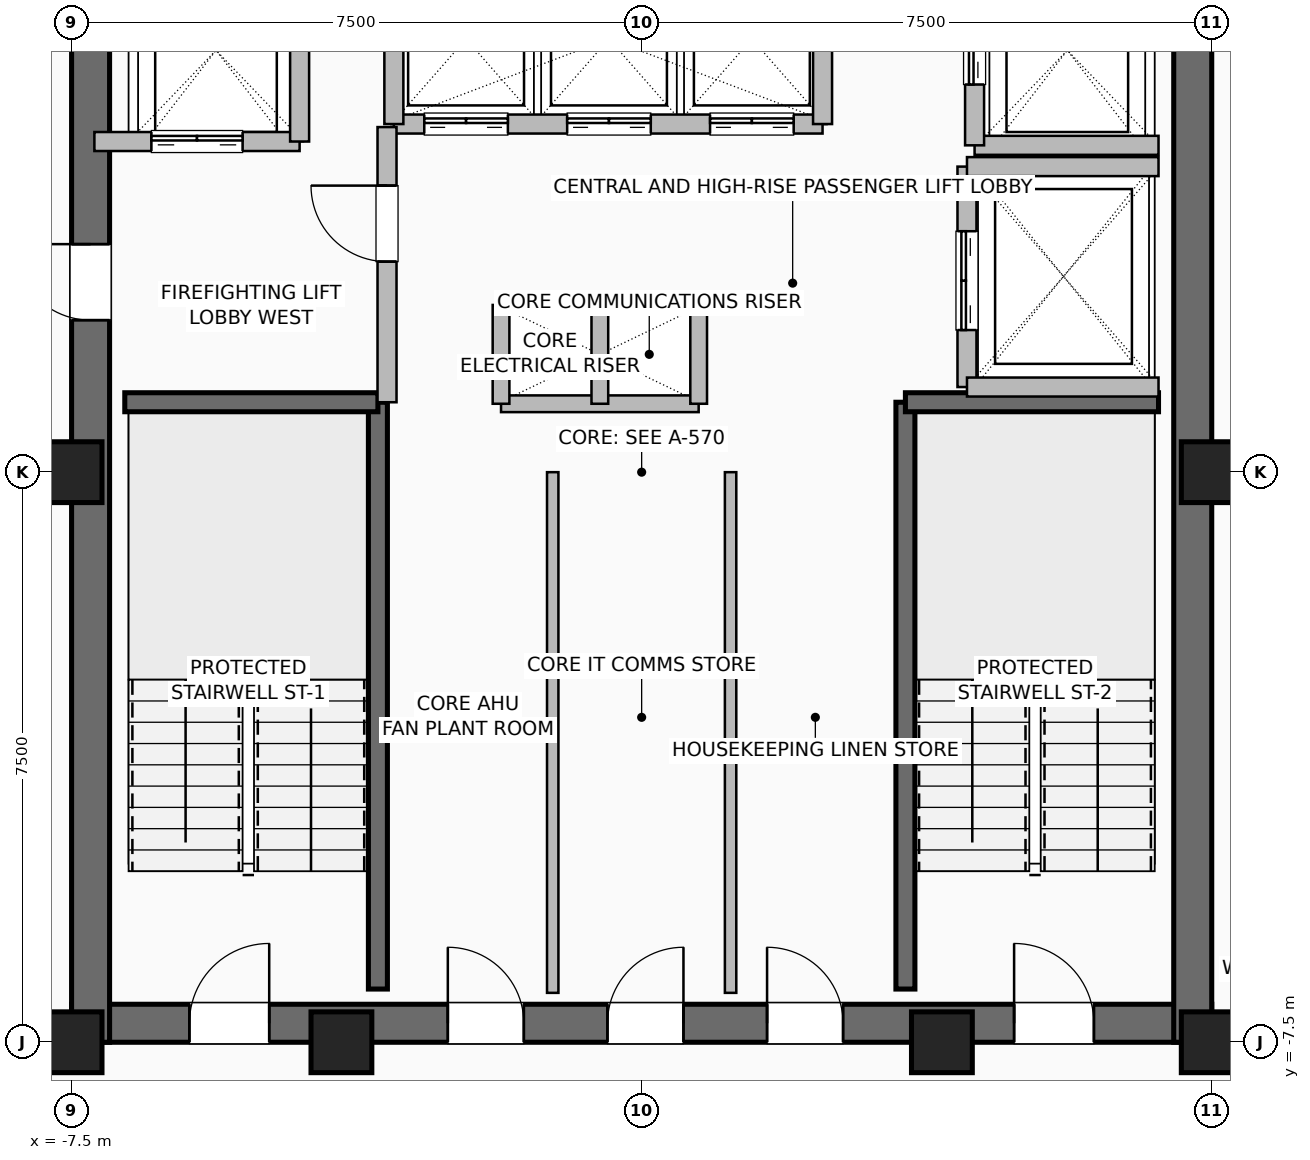
"""IFC4 building model, lengths in metres.
Left out: names, types, materials, properties, quantities, classifications, styles, units other than length and angle.
Written with IfcOpenShell. Run it as: python <this file> out.ifc"""

import sys

from ifc_helpers import new_model, si_unit, direction, frame, frame_2d, origin, origin_2d, place, context, subcontext, project, spatial, rectangle, hollow_rectangle, extrude, element, fill, save


model = new_model("IFC4")
c1 = context("Model", 3, precision=1e-05, world=origin(), true_north=direction((0.0, 1.0)))
c2 = subcontext(c1, "Body", "Model", "MODEL_VIEW")
j1 = project(units=[si_unit("LENGTHUNIT", "METRE"), si_unit("PLANEANGLEUNIT", "RADIAN")], contexts=[c1])
p1 = place(None, origin())
s1 = spatial("IfcSite", under=j1, at=p1, CompositionType="ELEMENT")
p2 = place(p1, origin())
s2 = spatial("IfcBuilding", under=s1, at=p2, CompositionType="ELEMENT")
p3 = place(p2, frame((0.0, 0.0, 279.2)))
s3 = spatial("IfcBuildingStorey", under=s2, at=p3, CompositionType="ELEMENT", Elevation=279.2)
for number, where, z_axis, x_axis in (
    (1, (-7.5, -7.5, 0.0), (0.0, 0.0, 1.0), (1.0, 0.0, 0.0)),
    (2, (-3.95, -7.5, 0.0), (0.0, 0.0, 1.0), (1.0, 0.0, 0.0)),
    (3, (3.95, -7.5, 0.0), (0.0, 0.0, 1.0), (1.0, 0.0, 0.0)),
    (4, (7.5, -7.5, 0.0), (0.0, 0.0, 1.0), (1.0, 0.0, 0.0)),
    (5, (7.5, 0.0, 0.0), (0.0, 0.0, 1.0), (1.0, 0.0, 0.0)),
    (6, (-7.5, 0.0, 0.0), (0.0, 0.0, 1.0), (1.0, 0.0, 0.0)),
):
    element("IfcColumn", number, at=place(p3, frame(where, z_axis=z_axis, x_axis=x_axis)), inside=s3, PredefinedType="COLUMN", context=c2, shape_type="SweptSolid", body=[
        extrude(hollow_rectangle(XDim=0.8, YDim=0.8, WallThickness=0.04, at=origin_2d()), origin(), (0.0, 0.0, 1.0), 3.6),
    ])
p4 = place(p3, frame((-7.5, -7.25, 0.0), z_axis=(0.0, 0.0, 1.0), x_axis=(1.0, 0.0, 0.0)))
e7 = element("IfcWall", 7, at=p4, inside=s3, PredefinedType="SHEAR", context=c2, shape_type="SweptSolid", body=[
    extrude(rectangle(XDim=15.0, YDim=0.5, at=frame_2d((7.5, 0.0))), origin(), (0.0, 0.0, 1.0), 3.36),
])
p5 = place(p4, frame((1.55, 0.0, 0.0)))
e8 = element("IfcOpeningElement", 8, at=p5, cuts=e7, PredefinedType="OPENING", context=c2, shape_type="SweptSolid", body=[
    extrude(rectangle(XDim=1.05, YDim=2.08, at=frame_2d((0.525, 1.04))), frame((0.0, 0.26, 0.0), z_axis=(0.0, -1.0, 0.0), x_axis=(1.0, 0.0, 0.0)), (0.0, 0.0, 1.0), 0.52),
])
p6 = place(p4, frame((12.4, 0.0, 0.0)))
e9 = element("IfcOpeningElement", 9, at=p6, cuts=e7, PredefinedType="OPENING", context=c2, shape_type="SweptSolid", body=[
    extrude(rectangle(XDim=1.05, YDim=2.08, at=frame_2d((0.525, 1.04))), frame((0.0, 0.26, 0.0), z_axis=(0.0, -1.0, 0.0), x_axis=(1.0, 0.0, 0.0)), (0.0, 0.0, 1.0), 0.52),
])
p7 = place(p4, frame((4.95, 0.0, 0.0)))
e10 = element("IfcOpeningElement", 10, at=p7, cuts=e7, PredefinedType="OPENING", context=c2, shape_type="SweptSolid", body=[
    extrude(rectangle(XDim=1.0, YDim=2.08, at=frame_2d((0.5, 1.04))), frame((0.0, 0.26, 0.0), z_axis=(0.0, -1.0, 0.0), x_axis=(1.0, 0.0, 0.0)), (0.0, 0.0, 1.0), 0.52),
])
p8 = place(p4, frame((7.05, 0.0, 0.0)))
e11 = element("IfcOpeningElement", 11, at=p8, cuts=e7, PredefinedType="OPENING", context=c2, shape_type="SweptSolid", body=[
    extrude(rectangle(XDim=1.0, YDim=2.08, at=frame_2d((0.5, 1.04))), frame((0.0, 0.26, 0.0), z_axis=(0.0, -1.0, 0.0), x_axis=(1.0, 0.0, 0.0)), (0.0, 0.0, 1.0), 0.52),
])
p9 = place(p4, frame((9.15, 0.0, 0.0)))
e12 = element("IfcOpeningElement", 12, at=p9, cuts=e7, PredefinedType="OPENING", context=c2, shape_type="SweptSolid", body=[
    extrude(rectangle(XDim=1.0, YDim=2.08, at=frame_2d((0.5, 1.04))), frame((0.0, 0.26, 0.0), z_axis=(0.0, -1.0, 0.0), x_axis=(1.0, 0.0, 0.0)), (0.0, 0.0, 1.0), 0.52),
])
p10 = place(p3, frame((-7.25, -7.5, 0.0), z_axis=(0.0, 0.0, 1.0), x_axis=(0.0, 1.0, 0.0)))
e13 = element("IfcWall", 13, at=p10, inside=s3, PredefinedType="SHEAR", context=c2, shape_type="SweptSolid", body=[
    extrude(rectangle(XDim=15.0, YDim=0.5, at=frame_2d((7.5, 0.0))), origin(), (0.0, 0.0, 1.0), 3.36),
])
p11 = place(p10, frame((9.5, 0.0, 0.0)))
e14 = element("IfcOpeningElement", 14, at=p11, cuts=e13, PredefinedType="OPENING", context=c2, shape_type="SweptSolid", body=[
    extrude(rectangle(XDim=1.0, YDim=2.08, at=frame_2d((0.5, 1.04))), frame((0.0, 0.26, 0.0), z_axis=(0.0, -1.0, 0.0), x_axis=(1.0, 0.0, 0.0)), (0.0, 0.0, 1.0), 0.52),
])
p12 = place(p3, frame((7.25, -7.5, 0.0), z_axis=(0.0, 0.0, 1.0), x_axis=(0.0, 1.0, 0.0)))
e15 = element("IfcWall", 15, at=p12, inside=s3, PredefinedType="SHEAR", context=c2, shape_type="SweptSolid", body=[
    extrude(rectangle(XDim=15.0, YDim=0.5, at=frame_2d((7.5, 0.0))), origin(), (0.0, 0.0, 1.0), 3.36),
])
p13 = place(p3, frame((-3.47, -6.8, 0.0), z_axis=(0.0, 0.0, 1.0), x_axis=(0.0, 1.0, 0.0)))
e16 = element("IfcWall", 16, at=p13, inside=s3, PredefinedType="SHEAR", context=c2, shape_type="SweptSolid", body=[
    extrude(rectangle(XDim=7.72, YDim=0.25, at=frame_2d((3.86, 0.0))), origin(), (0.0, 0.0, 1.0), 3.36),
])
p14 = place(p3, frame((-6.8, 0.92, 0.0), z_axis=(0.0, 0.0, 1.0), x_axis=(1.0, 0.0, 0.0)))
e17 = element("IfcWall", 17, at=p14, inside=s3, PredefinedType="SHEAR", context=c2, shape_type="SweptSolid", body=[
    extrude(rectangle(XDim=3.33, YDim=0.25, at=frame_2d((1.665, 0.0))), origin(), (0.0, 0.0, 1.0), 3.36),
])
p15 = place(p3, frame((3.47, -6.8, 0.0), z_axis=(0.0, 0.0, 1.0), x_axis=(0.0, 1.0, 0.0)))
e18 = element("IfcWall", 18, at=p15, inside=s3, PredefinedType="SHEAR", context=c2, shape_type="SweptSolid", body=[
    extrude(rectangle(XDim=7.72, YDim=0.25, at=frame_2d((3.86, 0.0))), origin(), (0.0, 0.0, 1.0), 3.36),
])
p16 = place(p3, frame((3.47, 0.92, 0.0), z_axis=(0.0, 0.0, 1.0), x_axis=(1.0, 0.0, 0.0)))
e19 = element("IfcWall", 19, at=p16, inside=s3, PredefinedType="SHEAR", context=c2, shape_type="SweptSolid", body=[
    extrude(rectangle(XDim=3.33, YDim=0.25, at=frame_2d((1.665, 0.0))), origin(), (0.0, 0.0, 1.0), 3.36),
])
for number, where, z_axis, x_axis in (
    (20, (-1.85, 2.2, 0.0), (0.0, 0.0, 1.0), (1.0, 0.0, 0.0)),
    (21, (-1.85, 0.9, 0.0), (0.0, 0.0, 1.0), (1.0, 0.0, 0.0)),
):
    element("IfcWall", number, at=place(p3, frame(where, z_axis=z_axis, x_axis=x_axis)), inside=s3, PredefinedType="PARTITIONING", context=c2, shape_type="SweptSolid", body=[
        extrude(rectangle(XDim=2.6, YDim=0.22, at=frame_2d((1.3, 0.0))), origin(), (0.0, 0.0, 1.0), 3.36),
    ])
for number, where, z_axis, x_axis in (
    (22, (-0.55, 0.9, 0.0), (0.0, 0.0, 1.0), (0.0, 1.0, 0.0)),
    (23, (0.75, 0.9, 0.0), (0.0, 0.0, 1.0), (0.0, 1.0, 0.0)),
    (24, (-1.85, 0.9, 0.0), (0.0, 0.0, 1.0), (0.0, 1.0, 0.0)),
):
    element("IfcWall", number, at=place(p3, frame(where, z_axis=z_axis, x_axis=x_axis)), inside=s3, PredefinedType="PARTITIONING", context=c2, shape_type="SweptSolid", body=[
        extrude(rectangle(XDim=1.3, YDim=0.22, at=frame_2d((0.65, 0.0))), origin(), (0.0, 0.0, 1.0), 3.36),
    ])
p17 = place(p3, frame((-3.26, 4.58, 0.0), z_axis=(0.0, 0.0, 1.0), x_axis=(1.0, 0.0, 0.0)))
e25 = element("IfcWall", 25, at=p17, inside=s3, PredefinedType="SHEAR", context=c2, shape_type="SweptSolid", body=[
    extrude(rectangle(XDim=5.64, YDim=0.25, at=frame_2d((2.82, 0.0))), origin(), (0.0, 0.0, 1.0), 3.36),
])
p18 = place(p17, frame((0.4, 0.0, 0.0)))
e26 = element("IfcOpeningElement", 26, at=p18, cuts=e25, PredefinedType="OPENING", context=c2, shape_type="SweptSolid", body=[
    extrude(rectangle(XDim=1.1, YDim=2.2, at=frame_2d((0.55, 1.1))), frame((0.0, 0.135, 0.0), z_axis=(0.0, -1.0, 0.0), x_axis=(1.0, 0.0, 0.0)), (0.0, 0.0, 1.0), 0.27),
])
p19 = place(p17, frame((2.28, 0.0, 0.0)))
e27 = element("IfcOpeningElement", 27, at=p19, cuts=e25, PredefinedType="OPENING", context=c2, shape_type="SweptSolid", body=[
    extrude(rectangle(XDim=1.1, YDim=2.2, at=frame_2d((0.55, 1.1))), frame((0.0, 0.135, 0.0), z_axis=(0.0, -1.0, 0.0), x_axis=(1.0, 0.0, 0.0)), (0.0, 0.0, 1.0), 0.27),
])
p20 = place(p17, frame((4.16, 0.0, 0.0)))
e28 = element("IfcOpeningElement", 28, at=p20, cuts=e25, PredefinedType="OPENING", context=c2, shape_type="SweptSolid", body=[
    extrude(rectangle(XDim=1.1, YDim=2.2, at=frame_2d((0.55, 1.1))), frame((0.0, 0.135, 0.0), z_axis=(0.0, -1.0, 0.0), x_axis=(1.0, 0.0, 0.0)), (0.0, 0.0, 1.0), 0.27),
])
for number, where, z_axis, x_axis in (
    (29, (-3.26, 4.58, 0.0), (0.0, 0.0, 1.0), (0.0, 1.0, 0.0)),
    (30, (2.38, 4.58, 0.0), (0.0, 0.0, 1.0), (0.0, 1.0, 0.0)),
):
    element("IfcWall", number, at=place(p3, frame(where, z_axis=z_axis, x_axis=x_axis)), inside=s3, PredefinedType="SHEAR", context=c2, shape_type="SweptSolid", body=[
        extrude(rectangle(XDim=2.22, YDim=0.25, at=frame_2d((1.11, 0.0))), origin(), (0.0, 0.0, 1.0), 3.36),
    ])
p21 = place(p3, frame((-7.2, 4.35, 0.0), z_axis=(0.0, 0.0, 1.0), x_axis=(1.0, 0.0, 0.0)))
e31 = element("IfcWall", 31, at=p21, inside=s3, PredefinedType="SHEAR", context=c2, shape_type="SweptSolid", body=[
    extrude(rectangle(XDim=2.7, YDim=0.25, at=frame_2d((1.35, 0.0))), origin(), (0.0, 0.0, 1.0), 3.36),
])
p22 = place(p21, frame((0.75, 0.0, 0.0)))
e32 = element("IfcOpeningElement", 32, at=p22, cuts=e31, PredefinedType="OPENING", context=c2, shape_type="SweptSolid", body=[
    extrude(rectangle(XDim=1.2, YDim=2.2, at=frame_2d((0.6, 1.1))), frame((0.0, 0.135, 0.0), z_axis=(0.0, -1.0, 0.0), x_axis=(1.0, 0.0, 0.0)), (0.0, 0.0, 1.0), 0.27),
])
p23 = place(p3, frame((-4.5, 4.35, 0.0), z_axis=(0.0, 0.0, 1.0), x_axis=(0.0, 1.0, 0.0)))
e33 = element("IfcWall", 33, at=p23, inside=s3, PredefinedType="SHEAR", context=c2, shape_type="SweptSolid", body=[
    extrude(rectangle(XDim=2.85, YDim=0.25, at=frame_2d((1.425, 0.0))), origin(), (0.0, 0.0, 1.0), 3.36),
])
p24 = place(p3, frame((4.38, 4.3, 0.0), z_axis=(0.0, 0.0, 1.0), x_axis=(1.0, 0.0, 0.0)))
e34 = element("IfcWall", 34, at=p24, inside=s3, PredefinedType="SHEAR", context=c2, shape_type="SweptSolid", body=[
    extrude(rectangle(XDim=2.42, YDim=0.25, at=frame_2d((1.21, 0.0))), origin(), (0.0, 0.0, 1.0), 3.36),
])
p25 = place(p3, frame((4.38, 4.3, 0.0), z_axis=(0.0, 0.0, 1.0), x_axis=(0.0, 1.0, 0.0)))
e35 = element("IfcWall", 35, at=p25, inside=s3, PredefinedType="SHEAR", context=c2, shape_type="SweptSolid", body=[
    extrude(rectangle(XDim=2.5, YDim=0.25, at=frame_2d((1.25, 0.0))), origin(), (0.0, 0.0, 1.0), 3.36),
])
p26 = place(p25, frame((0.8, 0.0, 0.0)))
e36 = element("IfcOpeningElement", 36, at=p26, cuts=e35, PredefinedType="OPENING", context=c2, shape_type="SweptSolid", body=[
    extrude(rectangle(XDim=1.2, YDim=2.2, at=frame_2d((0.6, 1.1))), frame((0.0, 0.135, 0.0), z_axis=(0.0, -1.0, 0.0), x_axis=(1.0, 0.0, 0.0)), (0.0, 0.0, 1.0), 0.27),
])
p27 = place(p3, frame((4.28, 1.12, 0.0), z_axis=(0.0, 0.0, 1.0), x_axis=(0.0, 1.0, 0.0)))
e37 = element("IfcWall", 37, at=p27, inside=s3, PredefinedType="SHEAR", context=c2, shape_type="SweptSolid", body=[
    extrude(rectangle(XDim=2.9, YDim=0.25, at=frame_2d((1.45, 0.0))), origin(), (0.0, 0.0, 1.0), 3.36),
])
p28 = place(p27, frame((0.75, 0.0, 0.0)))
e38 = element("IfcOpeningElement", 38, at=p28, cuts=e37, PredefinedType="OPENING", context=c2, shape_type="SweptSolid", body=[
    extrude(rectangle(XDim=1.3, YDim=2.3, at=frame_2d((0.65, 1.15))), frame((0.0, 0.135, 0.0), z_axis=(0.0, -1.0, 0.0), x_axis=(1.0, 0.0, 0.0)), (0.0, 0.0, 1.0), 0.27),
])
for number, where, z_axis, x_axis in (
    (39, (4.28, 1.12, 0.0), (0.0, 0.0, 1.0), (1.0, 0.0, 0.0)),
    (40, (4.28, 4.02, 0.0), (0.0, 0.0, 1.0), (1.0, 0.0, 0.0)),
):
    element("IfcWall", number, at=place(p3, frame(where, z_axis=z_axis, x_axis=x_axis)), inside=s3, PredefinedType="SHEAR", context=c2, shape_type="SweptSolid", body=[
        extrude(rectangle(XDim=2.52, YDim=0.25, at=frame_2d((1.26, 0.0))), origin(), (0.0, 0.0, 1.0), 3.36),
    ])
p29 = place(p3, frame((-3.35, 0.92, 0.0), z_axis=(0.0, 0.0, 1.0), x_axis=(0.0, 1.0, 0.0)))
e41 = element("IfcWall", 41, at=p29, inside=s3, PredefinedType="SHEAR", context=c2, shape_type="SweptSolid", body=[
    extrude(rectangle(XDim=3.62, YDim=0.25, at=frame_2d((1.81, 0.0))), origin(), (0.0, 0.0, 1.0), 3.36),
])
p30 = place(p29, frame((1.85, 0.0, 0.0)))
e42 = element("IfcOpeningElement", 42, at=p30, cuts=e41, PredefinedType="OPENING", context=c2, shape_type="SweptSolid", body=[
    extrude(rectangle(XDim=1.0, YDim=2.08, at=frame_2d((0.5, 1.04))), frame((0.0, 0.135, 0.0), z_axis=(0.0, -1.0, 0.0), x_axis=(1.0, 0.0, 0.0)), (0.0, 0.0, 1.0), 0.27),
])
for number, where, z_axis, x_axis in (
    (43, (-1.17, -6.85, 0.0), (0.0, 0.0, 1.0), (0.0, 1.0, 0.0)),
    (44, (1.17, -6.85, 0.0), (0.0, 0.0, 1.0), (0.0, 1.0, 0.0)),
):
    element("IfcWall", number, at=place(p3, frame(where, z_axis=z_axis, x_axis=x_axis)), inside=s3, PredefinedType="PARTITIONING", context=c2, shape_type="SweptSolid", body=[
        extrude(rectangle(XDim=6.85, YDim=0.15, at=frame_2d((3.425, 0.0))), origin(), (0.0, 0.0, 1.0), 3.36),
    ])
p31 = place(p3, frame((7.45, -7.48, 0.0), z_axis=(0.0, 0.0, 1.0), x_axis=(1.0, 0.0, 0.0)))
e45 = element("IfcWall", 45, at=p31, inside=s3, PredefinedType="PARTITIONING", context=c2, shape_type="SweptSolid", body=[
    extrude(rectangle(XDim=0.95, YDim=0.15, at=frame_2d((0.475, 0.0))), origin(), (0.0, 0.0, 1.0), 3.36),
])
p32 = place(p5, origin())
e46 = element("IfcDoor", 46, at=p32, inside=s3, OperationType="SINGLE_SWING_RIGHT", PredefinedType="DOOR", context=c2, shape_type="SweptSolid", body=[
    extrude(rectangle(XDim=1.05, YDim=2.08, at=frame_2d((0.525, 1.04))), frame((0.0, 0.025, 0.0), z_axis=(0.0, -1.0, 0.0), x_axis=(1.0, 0.0, 0.0)), (0.0, 0.0, 1.0), 0.05),
])
fill(e8, e46)
p33 = place(p6, origin())
e47 = element("IfcDoor", 47, at=p33, inside=s3, OperationType="SINGLE_SWING_LEFT", PredefinedType="DOOR", context=c2, shape_type="SweptSolid", body=[
    extrude(rectangle(XDim=1.05, YDim=2.08, at=frame_2d((0.525, 1.04))), frame((0.0, 0.025, 0.0), z_axis=(0.0, -1.0, 0.0), x_axis=(1.0, 0.0, 0.0)), (0.0, 0.0, 1.0), 0.05),
])
fill(e9, e47)
p34 = place(p11, origin())
e48 = element("IfcDoor", 48, at=p34, inside=s3, OperationType="SINGLE_SWING_RIGHT", PredefinedType="DOOR", context=c2, shape_type="SweptSolid", body=[
    extrude(rectangle(XDim=1.0, YDim=2.08, at=frame_2d((0.5, 1.04))), frame((0.0, 0.025, 0.0), z_axis=(0.0, -1.0, 0.0), x_axis=(1.0, 0.0, 0.0)), (0.0, 0.0, 1.0), 0.05),
])
fill(e14, e48)
p35 = place(p7, origin())
e49 = element("IfcDoor", 49, at=p35, inside=s3, OperationType="SINGLE_SWING_LEFT", PredefinedType="DOOR", context=c2, shape_type="SweptSolid", body=[
    extrude(rectangle(XDim=1.0, YDim=2.08, at=frame_2d((0.5, 1.04))), frame((0.0, 0.025, 0.0), z_axis=(0.0, -1.0, 0.0), x_axis=(1.0, 0.0, 0.0)), (0.0, 0.0, 1.0), 0.05),
])
fill(e10, e49)
p36 = place(p8, origin())
e50 = element("IfcDoor", 50, at=p36, inside=s3, OperationType="SINGLE_SWING_RIGHT", PredefinedType="DOOR", context=c2, shape_type="SweptSolid", body=[
    extrude(rectangle(XDim=1.0, YDim=2.08, at=frame_2d((0.5, 1.04))), frame((0.0, 0.025, 0.0), z_axis=(0.0, -1.0, 0.0), x_axis=(1.0, 0.0, 0.0)), (0.0, 0.0, 1.0), 0.05),
])
fill(e11, e50)
p37 = place(p9, origin())
e51 = element("IfcDoor", 51, at=p37, inside=s3, OperationType="SINGLE_SWING_LEFT", PredefinedType="DOOR", context=c2, shape_type="SweptSolid", body=[
    extrude(rectangle(XDim=1.0, YDim=2.08, at=frame_2d((0.5, 1.04))), frame((0.0, 0.025, 0.0), z_axis=(0.0, -1.0, 0.0), x_axis=(1.0, 0.0, 0.0)), (0.0, 0.0, 1.0), 0.05),
])
fill(e12, e51)
p38 = place(p18, origin())
e52 = element("IfcDoor", 52, at=p38, inside=s3, OperationType="DOUBLE_DOOR_SLIDING", PredefinedType="DOOR", context=c2, shape_type="SweptSolid", body=[
    extrude(rectangle(XDim=1.1, YDim=2.2, at=frame_2d((0.55, 1.1))), frame((0.0, 0.025, 0.0), z_axis=(0.0, -1.0, 0.0), x_axis=(1.0, 0.0, 0.0)), (0.0, 0.0, 1.0), 0.05),
])
fill(e26, e52)
p39 = place(p19, origin())
e53 = element("IfcDoor", 53, at=p39, inside=s3, OperationType="DOUBLE_DOOR_SLIDING", PredefinedType="DOOR", context=c2, shape_type="SweptSolid", body=[
    extrude(rectangle(XDim=1.1, YDim=2.2, at=frame_2d((0.55, 1.1))), frame((0.0, 0.025, 0.0), z_axis=(0.0, -1.0, 0.0), x_axis=(1.0, 0.0, 0.0)), (0.0, 0.0, 1.0), 0.05),
])
fill(e27, e53)
p40 = place(p20, origin())
e54 = element("IfcDoor", 54, at=p40, inside=s3, OperationType="DOUBLE_DOOR_SLIDING", PredefinedType="DOOR", context=c2, shape_type="SweptSolid", body=[
    extrude(rectangle(XDim=1.1, YDim=2.2, at=frame_2d((0.55, 1.1))), frame((0.0, 0.025, 0.0), z_axis=(0.0, -1.0, 0.0), x_axis=(1.0, 0.0, 0.0)), (0.0, 0.0, 1.0), 0.05),
])
fill(e28, e54)
p41 = place(p22, origin())
e55 = element("IfcDoor", 55, at=p41, inside=s3, OperationType="DOUBLE_DOOR_SLIDING", PredefinedType="DOOR", context=c2, shape_type="SweptSolid", body=[
    extrude(rectangle(XDim=1.2, YDim=2.2, at=frame_2d((0.6, 1.1))), frame((0.0, 0.025, 0.0), z_axis=(0.0, -1.0, 0.0), x_axis=(1.0, 0.0, 0.0)), (0.0, 0.0, 1.0), 0.05),
])
fill(e32, e55)
p42 = place(p26, origin())
e56 = element("IfcDoor", 56, at=p42, inside=s3, OperationType="DOUBLE_DOOR_SLIDING", PredefinedType="DOOR", context=c2, shape_type="SweptSolid", body=[
    extrude(rectangle(XDim=1.2, YDim=2.2, at=frame_2d((0.6, 1.1))), frame((0.0, 0.025, 0.0), z_axis=(0.0, -1.0, 0.0), x_axis=(1.0, 0.0, 0.0)), (0.0, 0.0, 1.0), 0.05),
])
fill(e36, e56)
p43 = place(p28, origin())
e57 = element("IfcDoor", 57, at=p43, inside=s3, OperationType="DOUBLE_DOOR_SLIDING", PredefinedType="DOOR", context=c2, shape_type="SweptSolid", body=[
    extrude(rectangle(XDim=1.3, YDim=2.3, at=frame_2d((0.65, 1.15))), frame((0.0, 0.025, 0.0), z_axis=(0.0, -1.0, 0.0), x_axis=(1.0, 0.0, 0.0)), (0.0, 0.0, 1.0), 0.05),
])
fill(e38, e57)
p44 = place(p30, origin())
e58 = element("IfcDoor", 58, at=p44, inside=s3, OperationType="SINGLE_SWING_RIGHT", PredefinedType="DOOR", context=c2, shape_type="SweptSolid", body=[
    extrude(rectangle(XDim=1.0, YDim=2.08, at=frame_2d((0.5, 1.04))), frame((0.0, 0.025, 0.0), z_axis=(0.0, -1.0, 0.0), x_axis=(1.0, 0.0, 0.0)), (0.0, 0.0, 1.0), 0.05),
])
fill(e42, e58)
save(model, sys.argv[1])
